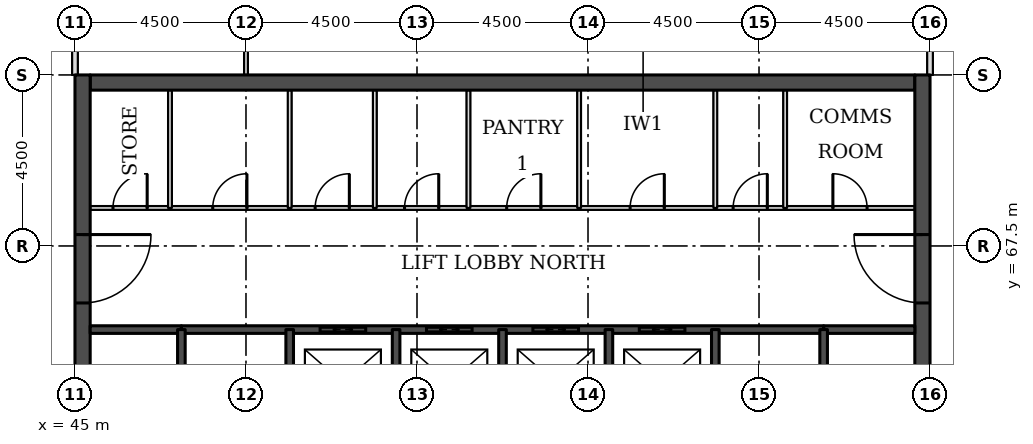
"""IFC4 building model, lengths in metres.
Left out: names, types, materials, properties, quantities, classifications, styles, units other than length and angle.
Written with IfcOpenShell. Run it as: python <this file> out.ifc"""

import sys

from ifc_helpers import new_model, si_unit, direction, frame, frame_2d, origin, place, context, subcontext, project, spatial, rectangle, extrude, element, fill, save


model = new_model("IFC4")
c1 = context("Model", 3, precision=1e-05, world=origin(), true_north=direction((0.0, 1.0)))
c2 = subcontext(c1, "Body", "Model", "MODEL_VIEW")
j1 = project(units=[si_unit("LENGTHUNIT", "METRE"), si_unit("PLANEANGLEUNIT", "RADIAN")], contexts=[c1])
p1 = place(None, origin())
s1 = spatial("IfcSite", under=j1, at=p1, CompositionType="ELEMENT")
p2 = place(p1, origin())
s2 = spatial("IfcBuilding", under=s1, at=p2, CompositionType="ELEMENT")
p3 = place(p2, frame((0.0, 0.0, 234.1)))
s3 = spatial("IfcBuildingStorey", under=s2, at=p3, CompositionType="ELEMENT", Elevation=234.1)
p4 = place(p3, frame((45.4, 71.8, 0.0), z_axis=(0.0, 0.0, 1.0), x_axis=(1.0, 0.0, 0.0)))
e1 = element("IfcWall", 1, at=p4, inside=s3, PredefinedType="SHEAR", context=c2, shape_type="SweptSolid", body=[
    extrude(rectangle(XDim=21.7, YDim=0.4, at=frame_2d((10.85, 0.0))), origin(), (0.0, 0.0, 1.0), 3.7),
])
p5 = place(p3, frame((45.2, 49.5, 0.0), z_axis=(0.0, 0.0, 1.0), x_axis=(0.0, 1.0, 0.0)))
e2 = element("IfcWall", 2, at=p5, inside=s3, PredefinedType="SHEAR", context=c2, shape_type="SweptSolid", body=[
    extrude(rectangle(XDim=22.5, YDim=0.4, at=frame_2d((11.25, 0.0))), origin(), (0.0, 0.0, 1.0), 3.7),
])
p6 = place(p5, frame((4.2, 0.0, 0.0)))
e3 = element("IfcOpeningElement", 3, at=p6, cuts=e2, PredefinedType="OPENING", context=c2, shape_type="SweptSolid", body=[
    extrude(rectangle(XDim=1.8, YDim=2.1, at=frame_2d((0.9, 1.05))), frame((0.0, 0.21, 0.0), z_axis=(0.0, -1.0, 0.0), x_axis=(1.0, 0.0, 0.0)), (0.0, 0.0, 1.0), 0.42),
])
p7 = place(p5, frame((6.9, 0.0, 0.0)))
e4 = element("IfcOpeningElement", 4, at=p7, cuts=e2, PredefinedType="OPENING", context=c2, shape_type="SweptSolid", body=[
    extrude(rectangle(XDim=1.1, YDim=2.1, at=frame_2d((0.55, 1.05))), frame((0.0, 0.21, 0.0), z_axis=(0.0, -1.0, 0.0), x_axis=(1.0, 0.0, 0.0)), (0.0, 0.0, 1.0), 0.42),
])
p8 = place(p5, frame((13.6, 0.0, 0.0)))
e5 = element("IfcOpeningElement", 5, at=p8, cuts=e2, PredefinedType="OPENING", context=c2, shape_type="SweptSolid", body=[
    extrude(rectangle(XDim=1.1, YDim=2.1, at=frame_2d((0.55, 1.05))), frame((0.0, 0.21, 0.0), z_axis=(0.0, -1.0, 0.0), x_axis=(1.0, 0.0, 0.0)), (0.0, 0.0, 1.0), 0.42),
])
p9 = place(p5, frame((16.5, 0.0, 0.0)))
e6 = element("IfcOpeningElement", 6, at=p9, cuts=e2, PredefinedType="OPENING", context=c2, shape_type="SweptSolid", body=[
    extrude(rectangle(XDim=1.8, YDim=2.1, at=frame_2d((0.9, 1.05))), frame((0.0, 0.21, 0.0), z_axis=(0.0, -1.0, 0.0), x_axis=(1.0, 0.0, 0.0)), (0.0, 0.0, 1.0), 0.42),
])
p10 = place(p3, frame((67.3, 49.5, 0.0), z_axis=(0.0, 0.0, 1.0), x_axis=(0.0, 1.0, 0.0)))
e7 = element("IfcWall", 7, at=p10, inside=s3, PredefinedType="SHEAR", context=c2, shape_type="SweptSolid", body=[
    extrude(rectangle(XDim=22.5, YDim=0.4, at=frame_2d((11.25, 0.0))), origin(), (0.0, 0.0, 1.0), 3.7),
])
p11 = place(p10, frame((4.2, 0.0, 0.0)))
e8 = element("IfcOpeningElement", 8, at=p11, cuts=e7, PredefinedType="OPENING", context=c2, shape_type="SweptSolid", body=[
    extrude(rectangle(XDim=1.8, YDim=2.1, at=frame_2d((0.9, 1.05))), frame((0.0, 0.21, 0.0), z_axis=(0.0, -1.0, 0.0), x_axis=(1.0, 0.0, 0.0)), (0.0, 0.0, 1.0), 0.42),
])
p12 = place(p10, frame((6.9, 0.0, 0.0)))
e9 = element("IfcOpeningElement", 9, at=p12, cuts=e7, PredefinedType="OPENING", context=c2, shape_type="SweptSolid", body=[
    extrude(rectangle(XDim=1.1, YDim=2.1, at=frame_2d((0.55, 1.05))), frame((0.0, 0.21, 0.0), z_axis=(0.0, -1.0, 0.0), x_axis=(1.0, 0.0, 0.0)), (0.0, 0.0, 1.0), 0.42),
])
p13 = place(p10, frame((13.6, 0.0, 0.0)))
e10 = element("IfcOpeningElement", 10, at=p13, cuts=e7, PredefinedType="OPENING", context=c2, shape_type="SweptSolid", body=[
    extrude(rectangle(XDim=1.1, YDim=2.1, at=frame_2d((0.55, 1.05))), frame((0.0, 0.21, 0.0), z_axis=(0.0, -1.0, 0.0), x_axis=(1.0, 0.0, 0.0)), (0.0, 0.0, 1.0), 0.42),
])
p14 = place(p10, frame((16.5, 0.0, 0.0)))
e11 = element("IfcOpeningElement", 11, at=p14, cuts=e7, PredefinedType="OPENING", context=c2, shape_type="SweptSolid", body=[
    extrude(rectangle(XDim=1.8, YDim=2.1, at=frame_2d((0.9, 1.05))), frame((0.0, 0.21, 0.0), z_axis=(0.0, -1.0, 0.0), x_axis=(1.0, 0.0, 0.0)), (0.0, 0.0, 1.0), 0.42),
])
p15 = place(p3, frame((45.0, 72.0, 0.0), z_axis=(0.0, 0.0, 1.0), x_axis=(0.0, 1.0, 0.0)))
e12 = element("IfcWall", 12, at=p15, inside=s3, PredefinedType="PARTITIONING", context=c2, shape_type="SweptSolid", body=[
    extrude(rectangle(XDim=3.0, YDim=0.15, at=frame_2d((1.5, 0.0))), origin(), (0.0, 0.0, 1.0), 3.022),
])
p16 = place(p3, frame((49.5, 72.0, 0.0), z_axis=(0.0, 0.0, 1.0), x_axis=(0.0, 1.0, 0.0)))
e13 = element("IfcWall", 13, at=p16, inside=s3, PredefinedType="PARTITIONING", context=c2, shape_type="SweptSolid", body=[
    extrude(rectangle(XDim=3.0, YDim=0.1, at=frame_2d((1.5, 0.0))), origin(), (0.0, 0.0, 1.0), 3.55),
])
p17 = place(p3, frame((67.5, 72.0, 0.0), z_axis=(0.0, 0.0, 1.0), x_axis=(0.0, 1.0, 0.0)))
e14 = element("IfcWall", 14, at=p17, inside=s3, PredefinedType="PARTITIONING", context=c2, shape_type="SweptSolid", body=[
    extrude(rectangle(XDim=3.0, YDim=0.15, at=frame_2d((1.5, 0.0))), origin(), (0.0, 0.0, 1.0), 3.022),
])
for number, where, z_axis, x_axis in (
    (15, (45.4, 65.3, 0.0), (0.0, 0.0, 1.0), (1.0, 0.0, 0.0)),
    (16, (64.7, 65.3, 0.0), (0.0, 0.0, 1.0), (1.0, 0.0, 0.0)),
):
    element("IfcWall", number, at=place(p3, frame(where, z_axis=z_axis, x_axis=x_axis)), inside=s3, PredefinedType="SOLIDWALL", context=c2, shape_type="SweptSolid", body=[
        extrude(rectangle(XDim=2.4, YDim=0.2, at=frame_2d((1.2, 0.0))), origin(), (0.0, 0.0, 1.0), 3.55),
    ])
p18 = place(p3, frame((47.8, 65.3, 0.0), z_axis=(0.0, 0.0, 1.0), x_axis=(1.0, 0.0, 0.0)))
e17 = element("IfcWall", 17, at=p18, inside=s3, PredefinedType="SOLIDWALL", context=c2, shape_type="SweptSolid", body=[
    extrude(rectangle(XDim=16.9, YDim=0.2, at=frame_2d((8.45, 0.0))), origin(), (0.0, 0.0, 1.0), 3.55),
])
p19 = place(p18, frame((3.65, 0.0, 0.0)))
e18 = element("IfcOpeningElement", 18, at=p19, cuts=e17, PredefinedType="OPENING", context=c2, shape_type="SweptSolid", body=[
    extrude(rectangle(XDim=1.2, YDim=2.1, at=frame_2d((0.6, 1.05))), frame((0.0, 0.11, 0.0), z_axis=(0.0, -1.0, 0.0), x_axis=(1.0, 0.0, 0.0)), (0.0, 0.0, 1.0), 0.22),
])
p20 = place(p18, frame((6.45, 0.0, 0.0)))
e19 = element("IfcOpeningElement", 19, at=p20, cuts=e17, PredefinedType="OPENING", context=c2, shape_type="SweptSolid", body=[
    extrude(rectangle(XDim=1.2, YDim=2.1, at=frame_2d((0.6, 1.05))), frame((0.0, 0.11, 0.0), z_axis=(0.0, -1.0, 0.0), x_axis=(1.0, 0.0, 0.0)), (0.0, 0.0, 1.0), 0.22),
])
p21 = place(p18, frame((9.25, 0.0, 0.0)))
e20 = element("IfcOpeningElement", 20, at=p21, cuts=e17, PredefinedType="OPENING", context=c2, shape_type="SweptSolid", body=[
    extrude(rectangle(XDim=1.2, YDim=2.1, at=frame_2d((0.6, 1.05))), frame((0.0, 0.11, 0.0), z_axis=(0.0, -1.0, 0.0), x_axis=(1.0, 0.0, 0.0)), (0.0, 0.0, 1.0), 0.22),
])
p22 = place(p18, frame((12.05, 0.0, 0.0)))
e21 = element("IfcOpeningElement", 21, at=p22, cuts=e17, PredefinedType="OPENING", context=c2, shape_type="SweptSolid", body=[
    extrude(rectangle(XDim=1.2, YDim=2.1, at=frame_2d((0.6, 1.05))), frame((0.0, 0.11, 0.0), z_axis=(0.0, -1.0, 0.0), x_axis=(1.0, 0.0, 0.0)), (0.0, 0.0, 1.0), 0.22),
])
p23 = place(p3, frame((45.4, 68.5, 0.0), z_axis=(0.0, 0.0, 1.0), x_axis=(1.0, 0.0, 0.0)))
e22 = element("IfcWall", 22, at=p23, inside=s3, PredefinedType="PARTITIONING", context=c2, shape_type="SweptSolid", body=[
    extrude(rectangle(XDim=21.7, YDim=0.1, at=frame_2d((10.85, 0.0))), origin(), (0.0, 0.0, 1.0), 3.55),
])
p24 = place(p23, frame((19.544, 0.0, 0.0)))
e23 = element("IfcOpeningElement", 23, at=p24, cuts=e22, PredefinedType="OPENING", context=c2, shape_type="SweptSolid", body=[
    extrude(rectangle(XDim=0.9, YDim=2.1, at=frame_2d((0.45, 1.05))), frame((0.0, 0.06, 0.0), z_axis=(0.0, -1.0, 0.0), x_axis=(1.0, 0.0, 0.0)), (0.0, 0.0, 1.0), 0.12),
])
p25 = place(p23, frame((16.919, 0.0, 0.0)))
e24 = element("IfcOpeningElement", 24, at=p25, cuts=e22, PredefinedType="OPENING", context=c2, shape_type="SweptSolid", body=[
    extrude(rectangle(XDim=0.9, YDim=2.1, at=frame_2d((0.45, 1.05))), frame((0.0, 0.06, 0.0), z_axis=(0.0, -1.0, 0.0), x_axis=(1.0, 0.0, 0.0)), (0.0, 0.0, 1.0), 0.12),
])
p26 = place(p23, frame((0.6, 0.0, 0.0)))
e25 = element("IfcOpeningElement", 25, at=p26, cuts=e22, PredefinedType="OPENING", context=c2, shape_type="SweptSolid", body=[
    extrude(rectangle(XDim=0.9, YDim=2.1, at=frame_2d((0.45, 1.05))), frame((0.0, 0.06, 0.0), z_axis=(0.0, -1.0, 0.0), x_axis=(1.0, 0.0, 0.0)), (0.0, 0.0, 1.0), 0.12),
])
p27 = place(p23, frame((3.225, 0.0, 0.0)))
e26 = element("IfcOpeningElement", 26, at=p27, cuts=e22, PredefinedType="OPENING", context=c2, shape_type="SweptSolid", body=[
    extrude(rectangle(XDim=0.9, YDim=2.1, at=frame_2d((0.45, 1.05))), frame((0.0, 0.06, 0.0), z_axis=(0.0, -1.0, 0.0), x_axis=(1.0, 0.0, 0.0)), (0.0, 0.0, 1.0), 0.12),
])
p28 = place(p23, frame((14.208, 0.0, 0.0)))
e27 = element("IfcOpeningElement", 27, at=p28, cuts=e22, PredefinedType="OPENING", context=c2, shape_type="SweptSolid", body=[
    extrude(rectangle(XDim=0.9, YDim=2.1, at=frame_2d((0.45, 1.05))), frame((0.0, 0.06, 0.0), z_axis=(0.0, -1.0, 0.0), x_axis=(1.0, 0.0, 0.0)), (0.0, 0.0, 1.0), 0.12),
])
p29 = place(p23, frame((10.96, 0.0, 0.0)))
e28 = element("IfcOpeningElement", 28, at=p29, cuts=e22, PredefinedType="OPENING", context=c2, shape_type="SweptSolid", body=[
    extrude(rectangle(XDim=0.9, YDim=2.1, at=frame_2d((0.45, 1.05))), frame((0.0, 0.06, 0.0), z_axis=(0.0, -1.0, 0.0), x_axis=(1.0, 0.0, 0.0)), (0.0, 0.0, 1.0), 0.12),
])
p30 = place(p23, frame((8.272, 0.0, 0.0)))
e29 = element("IfcOpeningElement", 29, at=p30, cuts=e22, PredefinedType="OPENING", context=c2, shape_type="SweptSolid", body=[
    extrude(rectangle(XDim=0.9, YDim=2.1, at=frame_2d((0.45, 1.05))), frame((0.0, 0.06, 0.0), z_axis=(0.0, -1.0, 0.0), x_axis=(1.0, 0.0, 0.0)), (0.0, 0.0, 1.0), 0.12),
])
p31 = place(p23, frame((5.92, 0.0, 0.0)))
e30 = element("IfcOpeningElement", 30, at=p31, cuts=e22, PredefinedType="OPENING", context=c2, shape_type="SweptSolid", body=[
    extrude(rectangle(XDim=0.9, YDim=2.1, at=frame_2d((0.45, 1.05))), frame((0.0, 0.06, 0.0), z_axis=(0.0, -1.0, 0.0), x_axis=(1.0, 0.0, 0.0)), (0.0, 0.0, 1.0), 0.12),
])
p32 = place(p3, frame((47.5, 68.5, 0.0), z_axis=(0.0, 0.0, 1.0), x_axis=(0.0, 1.0, 0.0)))
e31 = element("IfcWall", 31, at=p32, inside=s3, PredefinedType="PARTITIONING", context=c2, shape_type="SweptSolid", body=[
    extrude(rectangle(XDim=3.1, YDim=0.1, at=frame_2d((1.55, 0.0))), origin(), (0.0, 0.0, 1.0), 3.55),
])
p33 = place(p3, frame((47.8, 62.0, 0.0), z_axis=(0.0, 0.0, 1.0), x_axis=(0.0, 1.0, 0.0)))
e32 = element("IfcWall", 32, at=p33, inside=s3, PredefinedType="SOLIDWALL", context=c2, shape_type="SweptSolid", body=[
    extrude(rectangle(XDim=3.3, YDim=0.2, at=frame_2d((1.65, 0.0))), origin(), (0.0, 0.0, 1.0), 3.55),
])
p34 = place(p33, frame((1.1, 0.0, 0.0)))
e33 = element("IfcOpeningElement", 33, at=p34, cuts=e32, PredefinedType="OPENING", context=c2, shape_type="SweptSolid", body=[
    extrude(rectangle(XDim=1.1, YDim=2.1, at=frame_2d((0.55, 1.05))), frame((0.0, 0.11, 0.0), z_axis=(0.0, -1.0, 0.0), x_axis=(1.0, 0.0, 0.0)), (0.0, 0.0, 1.0), 0.22),
])
p35 = place(p3, frame((50.65, 68.5, 0.0), z_axis=(0.0, 0.0, 1.0), x_axis=(0.0, 1.0, 0.0)))
e34 = element("IfcWall", 34, at=p35, inside=s3, PredefinedType="PARTITIONING", context=c2, shape_type="SweptSolid", body=[
    extrude(rectangle(XDim=3.1, YDim=0.1, at=frame_2d((1.55, 0.0))), origin(), (0.0, 0.0, 1.0), 3.55),
])
p36 = place(p3, frame((50.65, 62.0, 0.0), z_axis=(0.0, 0.0, 1.0), x_axis=(0.0, 1.0, 0.0)))
e35 = element("IfcWall", 35, at=p36, inside=s3, PredefinedType="SOLIDWALL", context=c2, shape_type="SweptSolid", body=[
    extrude(rectangle(XDim=3.3, YDim=0.2, at=frame_2d((1.65, 0.0))), origin(), (0.0, 0.0, 1.0), 3.55),
])
p37 = place(p3, frame((52.89, 68.5, 0.0), z_axis=(0.0, 0.0, 1.0), x_axis=(0.0, 1.0, 0.0)))
e36 = element("IfcWall", 36, at=p37, inside=s3, PredefinedType="PARTITIONING", context=c2, shape_type="SweptSolid", body=[
    extrude(rectangle(XDim=3.1, YDim=0.1, at=frame_2d((1.55, 0.0))), origin(), (0.0, 0.0, 1.0), 3.55),
])
p38 = place(p3, frame((53.45, 62.5, 0.0), z_axis=(0.0, 0.0, 1.0), x_axis=(0.0, 1.0, 0.0)))
e37 = element("IfcWall", 37, at=p38, inside=s3, PredefinedType="SOLIDWALL", context=c2, shape_type="SweptSolid", body=[
    extrude(rectangle(XDim=2.8, YDim=0.2, at=frame_2d((1.4, 0.0))), origin(), (0.0, 0.0, 1.0), 3.55),
])
p39 = place(p3, frame((55.354, 68.5, 0.0), z_axis=(0.0, 0.0, 1.0), x_axis=(0.0, 1.0, 0.0)))
e38 = element("IfcWall", 38, at=p39, inside=s3, PredefinedType="PARTITIONING", context=c2, shape_type="SweptSolid", body=[
    extrude(rectangle(XDim=3.1, YDim=0.1, at=frame_2d((1.55, 0.0))), origin(), (0.0, 0.0, 1.0), 3.55),
])
p40 = place(p3, frame((56.25, 62.5, 0.0), z_axis=(0.0, 0.0, 1.0), x_axis=(0.0, 1.0, 0.0)))
e39 = element("IfcWall", 39, at=p40, inside=s3, PredefinedType="SOLIDWALL", context=c2, shape_type="SweptSolid", body=[
    extrude(rectangle(XDim=2.8, YDim=0.2, at=frame_2d((1.4, 0.0))), origin(), (0.0, 0.0, 1.0), 3.55),
])
p41 = place(p3, frame((58.266, 68.5, 0.0), z_axis=(0.0, 0.0, 1.0), x_axis=(0.0, 1.0, 0.0)))
e40 = element("IfcWall", 40, at=p41, inside=s3, PredefinedType="PARTITIONING", context=c2, shape_type="SweptSolid", body=[
    extrude(rectangle(XDim=3.1, YDim=0.1, at=frame_2d((1.55, 0.0))), origin(), (0.0, 0.0, 1.0), 3.55),
])
p42 = place(p3, frame((59.05, 62.5, 0.0), z_axis=(0.0, 0.0, 1.0), x_axis=(0.0, 1.0, 0.0)))
e41 = element("IfcWall", 41, at=p42, inside=s3, PredefinedType="SOLIDWALL", context=c2, shape_type="SweptSolid", body=[
    extrude(rectangle(XDim=2.8, YDim=0.2, at=frame_2d((1.4, 0.0))), origin(), (0.0, 0.0, 1.0), 3.55),
])
p43 = place(p3, frame((61.85, 68.5, 0.0), z_axis=(0.0, 0.0, 1.0), x_axis=(0.0, 1.0, 0.0)))
e42 = element("IfcWall", 42, at=p43, inside=s3, PredefinedType="PARTITIONING", context=c2, shape_type="SweptSolid", body=[
    extrude(rectangle(XDim=3.1, YDim=0.1, at=frame_2d((1.55, 0.0))), origin(), (0.0, 0.0, 1.0), 3.55),
])
p44 = place(p3, frame((61.85, 62.0, 0.0), z_axis=(0.0, 0.0, 1.0), x_axis=(0.0, 1.0, 0.0)))
e43 = element("IfcWall", 43, at=p44, inside=s3, PredefinedType="SOLIDWALL", context=c2, shape_type="SweptSolid", body=[
    extrude(rectangle(XDim=3.3, YDim=0.2, at=frame_2d((1.65, 0.0))), origin(), (0.0, 0.0, 1.0), 3.55),
])
p45 = place(p3, frame((63.688, 68.5, 0.0), z_axis=(0.0, 0.0, 1.0), x_axis=(0.0, 1.0, 0.0)))
e44 = element("IfcWall", 44, at=p45, inside=s3, PredefinedType="PARTITIONING", context=c2, shape_type="SweptSolid", body=[
    extrude(rectangle(XDim=3.1, YDim=0.1, at=frame_2d((1.55, 0.0))), origin(), (0.0, 0.0, 1.0), 3.55),
])
p46 = place(p3, frame((64.7, 62.0, 0.0), z_axis=(0.0, 0.0, 1.0), x_axis=(0.0, 1.0, 0.0)))
e45 = element("IfcWall", 45, at=p46, inside=s3, PredefinedType="SOLIDWALL", context=c2, shape_type="SweptSolid", body=[
    extrude(rectangle(XDim=3.3, YDim=0.2, at=frame_2d((1.65, 0.0))), origin(), (0.0, 0.0, 1.0), 3.55),
])
p47 = place(p46, frame((1.1, 0.0, 0.0)))
e46 = element("IfcOpeningElement", 46, at=p47, cuts=e45, PredefinedType="OPENING", context=c2, shape_type="SweptSolid", body=[
    extrude(rectangle(XDim=1.1, YDim=2.1, at=frame_2d((0.55, 1.05))), frame((0.0, 0.11, 0.0), z_axis=(0.0, -1.0, 0.0), x_axis=(1.0, 0.0, 0.0)), (0.0, 0.0, 1.0), 0.22),
])
p48 = place(p19, origin())
e47 = element("IfcDoor", 47, at=p48, inside=s3, OperationType="DOUBLE_DOOR_SLIDING", PredefinedType="DOOR", context=c2, shape_type="SweptSolid", body=[
    extrude(rectangle(XDim=1.2, YDim=2.1, at=frame_2d((0.6, 1.05))), frame((0.0, 0.025, 0.0), z_axis=(0.0, -1.0, 0.0), x_axis=(1.0, 0.0, 0.0)), (0.0, 0.0, 1.0), 0.05),
])
fill(e18, e47)
p49 = place(p20, origin())
e48 = element("IfcDoor", 48, at=p49, inside=s3, OperationType="DOUBLE_DOOR_SLIDING", PredefinedType="DOOR", context=c2, shape_type="SweptSolid", body=[
    extrude(rectangle(XDim=1.2, YDim=2.1, at=frame_2d((0.6, 1.05))), frame((0.0, 0.025, 0.0), z_axis=(0.0, -1.0, 0.0), x_axis=(1.0, 0.0, 0.0)), (0.0, 0.0, 1.0), 0.05),
])
fill(e19, e48)
p50 = place(p21, origin())
e49 = element("IfcDoor", 49, at=p50, inside=s3, OperationType="DOUBLE_DOOR_SLIDING", PredefinedType="DOOR", context=c2, shape_type="SweptSolid", body=[
    extrude(rectangle(XDim=1.2, YDim=2.1, at=frame_2d((0.6, 1.05))), frame((0.0, 0.025, 0.0), z_axis=(0.0, -1.0, 0.0), x_axis=(1.0, 0.0, 0.0)), (0.0, 0.0, 1.0), 0.05),
])
fill(e20, e49)
p51 = place(p22, origin())
e50 = element("IfcDoor", 50, at=p51, inside=s3, OperationType="DOUBLE_DOOR_SLIDING", PredefinedType="DOOR", context=c2, shape_type="SweptSolid", body=[
    extrude(rectangle(XDim=1.2, YDim=2.1, at=frame_2d((0.6, 1.05))), frame((0.0, 0.025, 0.0), z_axis=(0.0, -1.0, 0.0), x_axis=(1.0, 0.0, 0.0)), (0.0, 0.0, 1.0), 0.05),
])
fill(e21, e50)
p52 = place(p9, frame((1.8, 0.0, 0.0), z_axis=(0.0, 0.0, 1.0), x_axis=(-1.0, 0.0, 0.0)))
e51 = element("IfcDoor", 51, at=p52, inside=s3, OperationType="SINGLE_SWING_LEFT", PredefinedType="DOOR", context=c2, shape_type="SweptSolid", body=[
    extrude(rectangle(XDim=1.8, YDim=2.1, at=frame_2d((0.9, 1.05))), frame((0.0, 0.025, 0.0), z_axis=(0.0, -1.0, 0.0), x_axis=(1.0, 0.0, 0.0)), (0.0, 0.0, 1.0), 0.05),
])
fill(e6, e51)
p53 = place(p14, origin())
e52 = element("IfcDoor", 52, at=p53, inside=s3, OperationType="SINGLE_SWING_RIGHT", PredefinedType="DOOR", context=c2, shape_type="SweptSolid", body=[
    extrude(rectangle(XDim=1.8, YDim=2.1, at=frame_2d((0.9, 1.05))), frame((0.0, 0.025, 0.0), z_axis=(0.0, -1.0, 0.0), x_axis=(1.0, 0.0, 0.0)), (0.0, 0.0, 1.0), 0.05),
])
fill(e11, e52)
p54 = place(p24, origin())
e53 = element("IfcDoor", 53, at=p54, inside=s3, OperationType="SINGLE_SWING_LEFT", PredefinedType="DOOR", context=c2, shape_type="SweptSolid", body=[
    extrude(rectangle(XDim=0.9, YDim=2.1, at=frame_2d((0.45, 1.05))), frame((0.0, 0.025, 0.0), z_axis=(0.0, -1.0, 0.0), x_axis=(1.0, 0.0, 0.0)), (0.0, 0.0, 1.0), 0.05),
])
fill(e23, e53)
p55 = place(p25, origin())
e54 = element("IfcDoor", 54, at=p55, inside=s3, OperationType="SINGLE_SWING_RIGHT", PredefinedType="DOOR", context=c2, shape_type="SweptSolid", body=[
    extrude(rectangle(XDim=0.9, YDim=2.1, at=frame_2d((0.45, 1.05))), frame((0.0, 0.025, 0.0), z_axis=(0.0, -1.0, 0.0), x_axis=(1.0, 0.0, 0.0)), (0.0, 0.0, 1.0), 0.05),
])
fill(e24, e54)
p56 = place(p26, origin())
e55 = element("IfcDoor", 55, at=p56, inside=s3, OperationType="SINGLE_SWING_RIGHT", PredefinedType="DOOR", context=c2, shape_type="SweptSolid", body=[
    extrude(rectangle(XDim=0.9, YDim=2.1, at=frame_2d((0.45, 1.05))), frame((0.0, 0.025, 0.0), z_axis=(0.0, -1.0, 0.0), x_axis=(1.0, 0.0, 0.0)), (0.0, 0.0, 1.0), 0.05),
])
fill(e25, e55)
p57 = place(p27, origin())
e56 = element("IfcDoor", 56, at=p57, inside=s3, OperationType="SINGLE_SWING_RIGHT", PredefinedType="DOOR", context=c2, shape_type="SweptSolid", body=[
    extrude(rectangle(XDim=0.9, YDim=2.1, at=frame_2d((0.45, 1.05))), frame((0.0, 0.025, 0.0), z_axis=(0.0, -1.0, 0.0), x_axis=(1.0, 0.0, 0.0)), (0.0, 0.0, 1.0), 0.05),
])
fill(e26, e56)
p58 = place(p28, origin())
e57 = element("IfcDoor", 57, at=p58, inside=s3, OperationType="SINGLE_SWING_RIGHT", PredefinedType="DOOR", context=c2, shape_type="SweptSolid", body=[
    extrude(rectangle(XDim=0.9, YDim=2.1, at=frame_2d((0.45, 1.05))), frame((0.0, 0.025, 0.0), z_axis=(0.0, -1.0, 0.0), x_axis=(1.0, 0.0, 0.0)), (0.0, 0.0, 1.0), 0.05),
])
fill(e27, e57)
p59 = place(p29, origin())
e58 = element("IfcDoor", 58, at=p59, inside=s3, OperationType="SINGLE_SWING_RIGHT", PredefinedType="DOOR", context=c2, shape_type="SweptSolid", body=[
    extrude(rectangle(XDim=0.9, YDim=2.1, at=frame_2d((0.45, 1.05))), frame((0.0, 0.025, 0.0), z_axis=(0.0, -1.0, 0.0), x_axis=(1.0, 0.0, 0.0)), (0.0, 0.0, 1.0), 0.05),
])
fill(e28, e58)
p60 = place(p30, origin())
e59 = element("IfcDoor", 59, at=p60, inside=s3, OperationType="SINGLE_SWING_RIGHT", PredefinedType="DOOR", context=c2, shape_type="SweptSolid", body=[
    extrude(rectangle(XDim=0.9, YDim=2.1, at=frame_2d((0.45, 1.05))), frame((0.0, 0.025, 0.0), z_axis=(0.0, -1.0, 0.0), x_axis=(1.0, 0.0, 0.0)), (0.0, 0.0, 1.0), 0.05),
])
fill(e29, e59)
p61 = place(p31, origin())
e60 = element("IfcDoor", 60, at=p61, inside=s3, OperationType="SINGLE_SWING_RIGHT", PredefinedType="DOOR", context=c2, shape_type="SweptSolid", body=[
    extrude(rectangle(XDim=0.9, YDim=2.1, at=frame_2d((0.45, 1.05))), frame((0.0, 0.025, 0.0), z_axis=(0.0, -1.0, 0.0), x_axis=(1.0, 0.0, 0.0)), (0.0, 0.0, 1.0), 0.05),
])
fill(e30, e60)
save(model, sys.argv[1])
